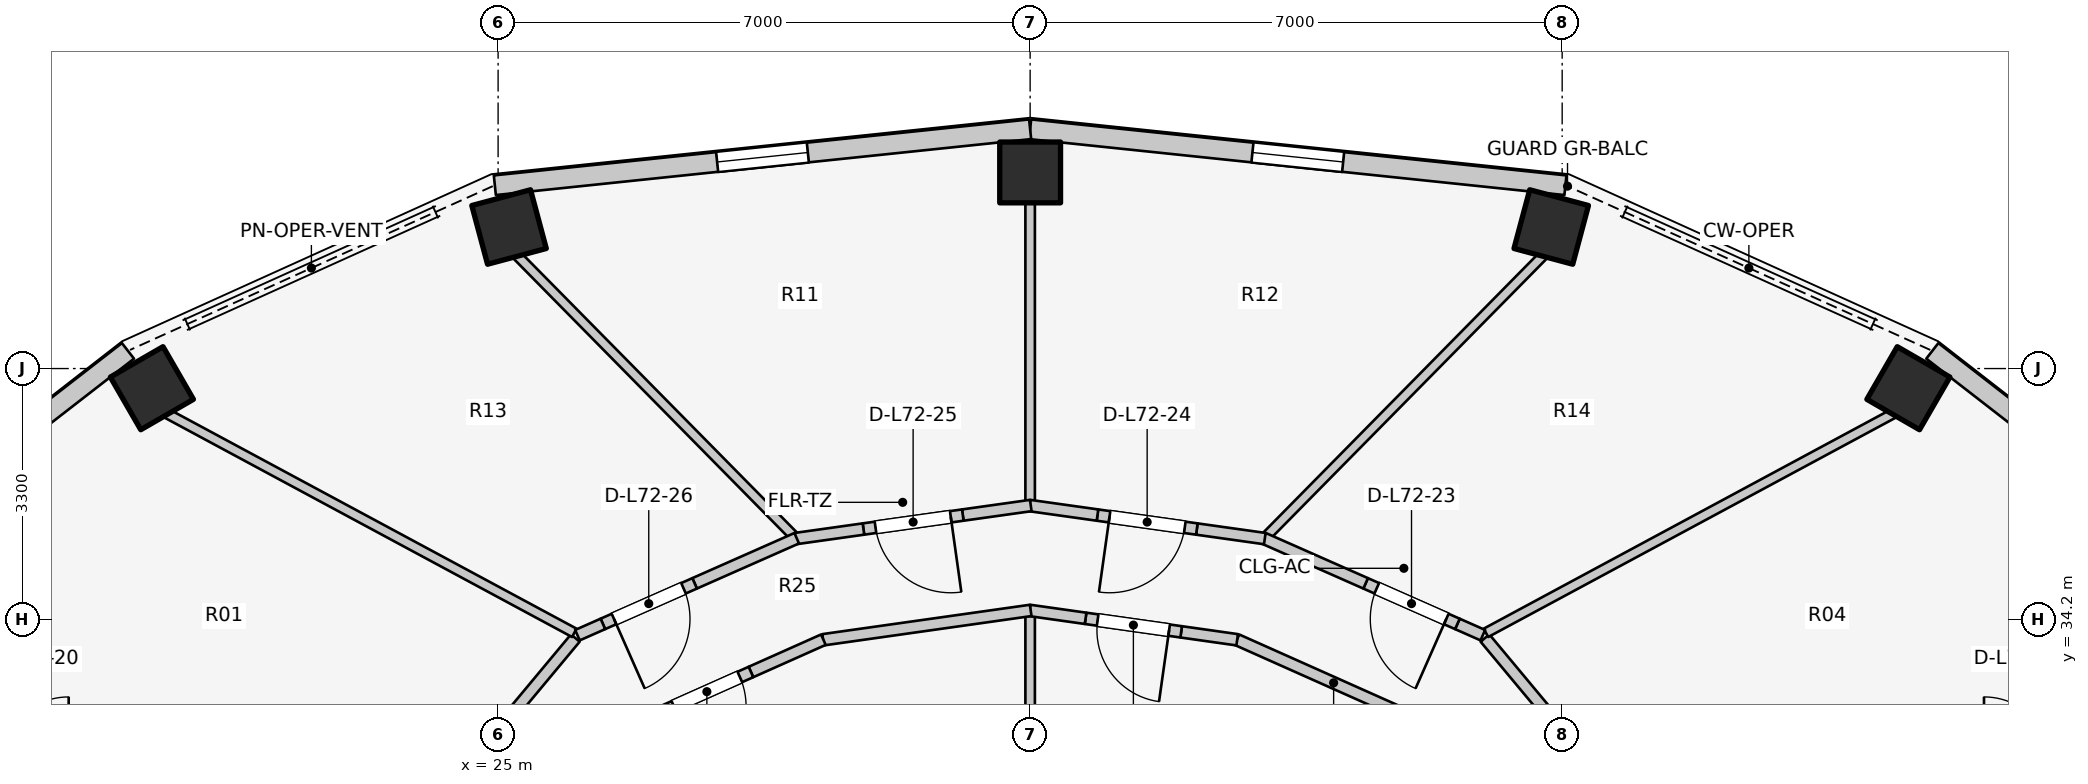
"""IFC4 building model, lengths in metres.
Left out: names, types, materials, properties, quantities, classifications, styles, units other than length and angle.
Written with IfcOpenShell. Run it as: python <this file> out.ifc"""

import sys

from ifc_helpers import new_model, si_unit, direction, frame, frame_2d, origin, origin_2d, place, context, subcontext, project, spatial, rectangle, extrude, element, fill, save


model = new_model("IFC4")
c1 = context("Model", 3, precision=1e-05, world=origin(), true_north=direction((0.0, 1.0)))
c2 = subcontext(c1, "Body", "Model", "MODEL_VIEW")
j1 = project(units=[si_unit("LENGTHUNIT", "METRE"), si_unit("PLANEANGLEUNIT", "RADIAN")], contexts=[c1])
p1 = place(None, origin())
s1 = spatial("IfcSite", under=j1, at=p1, CompositionType="ELEMENT")
p2 = place(p1, origin())
s2 = spatial("IfcBuilding", under=s1, at=p2, CompositionType="ELEMENT")
p3 = place(p2, frame((0.0, 0.0, 235.7)))
s3 = spatial("IfcBuildingStorey", under=s2, at=p3, CompositionType="ELEMENT", Elevation=235.7)
for number, where, z_axis, x_axis in (
    (1, (43.555, 37.241, 0.0), (0.0, 0.0, 1.0), (0.5, 0.866, 0.0)),
    (2, (38.856, 39.362, 0.0), (0.0, 0.0, 1.0), (0.259, 0.966, 0.0)),
    (3, (32.0, 40.08, 0.0), (0.0, 0.0, 1.0), (0.0, 1.0, 0.0)),
    (4, (25.144, 39.362, 0.0), (0.0, 0.0, 1.0), (-0.259, 0.966, 0.0)),
    (5, (20.445, 37.241, 0.0), (0.0, 0.0, 1.0), (-0.5, 0.866, 0.0)),
):
    element("IfcColumn", number, at=place(p3, frame(where, z_axis=z_axis, x_axis=x_axis)), inside=s3, PredefinedType="COLUMN", context=c2, shape_type="SweptSolid", body=[
        extrude(rectangle(XDim=0.8, YDim=0.8, at=origin_2d()), origin(), (0.0, 0.0, 1.0), 3.1),
    ])
p4 = place(p3, frame((47.558, 34.872, 0.0), z_axis=(0.0, 0.0, 1.0), x_axis=(-0.790126214723, 0.612944177563, 0.0)))
e6 = element("IfcWall", 6, at=p4, inside=s3, PredefinedType="STANDARD", context=c2, shape_type="SweptSolid", body=[
    extrude(rectangle(XDim=4.667, YDim=0.26, at=frame_2d((2.333, 0.0))), origin(), (0.0, 0.0, 1.0), 1.22),
])
p5 = place(p3, frame((39.043, 39.912, 0.0), z_axis=(0.0, 0.0, 1.0), x_axis=(-0.994582822721, 0.103947144014, 0.0)))
e7 = element("IfcWall", 7, at=p5, inside=s3, PredefinedType="STANDARD", context=c2, shape_type="SweptSolid", body=[
    extrude(rectangle(XDim=7.081, YDim=0.26, at=frame_2d((3.541, 0.0))), origin(), (0.0, 0.0, 1.0), 1.22),
])
p6 = place(p5, frame((2.941, 0.0, 0.15)))
e8 = element("IfcOpeningElement", 8, at=p6, cuts=e7, PredefinedType="OPENING", context=c2, shape_type="SweptSolid", body=[
    extrude(rectangle(XDim=1.2, YDim=0.9, at=frame_2d((0.6, 0.45))), frame((0.0, 0.14, 0.0), z_axis=(0.0, -1.0, 0.0), x_axis=(1.0, 0.0, 0.0)), (0.0, 0.0, 1.0), 0.28),
])
p7 = place(p3, frame((32.0, 40.648, 0.0), z_axis=(0.0, 0.0, 1.0), x_axis=(-0.994582822721, -0.103947144014, 0.0)))
e9 = element("IfcWall", 9, at=p7, inside=s3, PredefinedType="STANDARD", context=c2, shape_type="SweptSolid", body=[
    extrude(rectangle(XDim=7.081, YDim=0.26, at=frame_2d((3.541, 0.0))), origin(), (0.0, 0.0, 1.0), 1.22),
])
p8 = place(p7, frame((2.941, 0.0, 0.15)))
e10 = element("IfcOpeningElement", 10, at=p8, cuts=e9, PredefinedType="OPENING", context=c2, shape_type="SweptSolid", body=[
    extrude(rectangle(XDim=1.2, YDim=0.9, at=frame_2d((0.6, 0.45))), frame((0.0, 0.14, 0.0), z_axis=(0.0, -1.0, 0.0), x_axis=(1.0, 0.0, 0.0)), (0.0, 0.0, 1.0), 0.28),
])
p9 = place(p3, frame((20.13, 37.733, 0.0), z_axis=(0.0, 0.0, 1.0), x_axis=(-0.790126214723, -0.612944177563, 0.0)))
e11 = element("IfcWall", 11, at=p9, inside=s3, PredefinedType="STANDARD", context=c2, shape_type="SweptSolid", body=[
    extrude(rectangle(XDim=4.667, YDim=0.26, at=frame_2d((2.333, 0.0))), origin(), (0.0, 0.0, 1.0), 1.22),
])
p10 = place(p3, frame((32.0, 31.1, 0.0), z_axis=(0.0, 0.0, 1.0), x_axis=(0.0, 1.0, 0.0)))
e12 = element("IfcWall", 12, at=p10, inside=s3, PredefinedType="PARTITIONING", context=c2, shape_type="SweptSolid", body=[
    extrude(rectangle(XDim=3.218, YDim=0.125, at=frame_2d((1.609, 0.0))), origin(), (0.0, 0.0, 1.0), 1.22),
])
p11 = place(p3, frame((37.265, 32.798, 0.0), z_axis=(0.0, 0.0, 1.0), x_axis=(-0.913254317828, 0.407389924971, 0.0)))
e13 = element("IfcWall", 13, at=p11, inside=s3, PredefinedType="PARTITIONING", context=c2, shape_type="SweptSolid", body=[
    extrude(rectangle(XDim=2.787, YDim=0.15, at=frame_2d((1.393, 0.0))), origin(), (0.0, 0.0, 1.0), 1.22),
])
p12 = place(p3, frame((34.724, 33.932, 0.0), z_axis=(0.0, 0.0, 1.0), x_axis=(-0.990190745647, 0.13972217875, 0.0)))
e14 = element("IfcWall", 14, at=p12, inside=s3, PredefinedType="PARTITIONING", context=c2, shape_type="SweptSolid", body=[
    extrude(rectangle(XDim=0.744, YDim=0.15, at=frame_2d((0.372, 0.0))), origin(), (0.0, 0.0, 1.0), 2.575),
])
p13 = place(p3, frame((33.987, 34.036, 0.0), z_axis=(0.0, 0.0, 1.0), x_axis=(-0.990133183593, 0.140129507055, 0.0)))
e15 = element("IfcWall", 15, at=p13, inside=s3, PredefinedType="PARTITIONING", context=c2, shape_type="SweptSolid", body=[
    extrude(rectangle(XDim=1.27, YDim=0.15, at=frame_2d((0.635, 0.0))), origin(), (0.0, 0.0, 1.0), 2.575),
])
p14 = place(p13, frame((0.16, 0.0, 0.0)))
e16 = element("IfcOpeningElement", 16, at=p14, cuts=e15, PredefinedType="OPENING", context=c2, shape_type="SweptSolid", body=[
    extrude(rectangle(XDim=0.95, YDim=2.1, at=frame_2d((0.475, 1.05))), frame((0.0, 0.085, 0.0), z_axis=(0.0, -1.0, 0.0), x_axis=(1.0, 0.0, 0.0)), (0.0, 0.0, 1.0), 0.17),
])
p15 = place(p3, frame((32.729, 34.214, 0.0), z_axis=(0.0, 0.0, 1.0), x_axis=(-0.990138882688, 0.140089232242, 0.0)))
e17 = element("IfcWall", 17, at=p15, inside=s3, PredefinedType="PARTITIONING", context=c2, shape_type="SweptSolid", body=[
    extrude(rectangle(XDim=0.744, YDim=0.15, at=frame_2d((0.372, 0.0))), origin(), (0.0, 0.0, 1.0), 1.22),
])
p16 = place(p3, frame((32.007, 34.318, 0.0), z_axis=(0.0, 0.0, 1.0), x_axis=(-0.990150268487, -0.140008734782, 0.0)))
e18 = element("IfcWall", 18, at=p16, inside=s3, PredefinedType="PARTITIONING", context=c2, shape_type="SweptSolid", body=[
    extrude(rectangle(XDim=2.759, YDim=0.15, at=frame_2d((1.379, 0.0))), origin(), (0.0, 0.0, 1.0), 1.22),
])
p17 = place(p3, frame((29.28, 33.933, 0.0), z_axis=(0.0, 0.0, 1.0), x_axis=(-0.913260714955, -0.407375584099, 0.0)))
e19 = element("IfcWall", 19, at=p17, inside=s3, PredefinedType="PARTITIONING", context=c2, shape_type="SweptSolid", body=[
    extrude(rectangle(XDim=1.043, YDim=0.15, at=frame_2d((0.522, 0.0))), origin(), (0.0, 0.0, 1.0), 1.22),
])
p18 = place(p3, frame((28.327, 33.508, 0.0), z_axis=(0.0, 0.0, 1.0), x_axis=(-0.913279660534, -0.40733310896, 0.0)))
e20 = element("IfcWall", 20, at=p18, inside=s3, PredefinedType="PARTITIONING", context=c2, shape_type="SweptSolid", body=[
    extrude(rectangle(XDim=1.27, YDim=0.15, at=frame_2d((0.635, 0.0))), origin(), (0.0, 0.0, 1.0), 2.16),
])
p19 = place(p18, frame((0.16, 0.0, 0.0)))
e21 = element("IfcOpeningElement", 21, at=p19, cuts=e20, PredefinedType="OPENING", context=c2, shape_type="SweptSolid", body=[
    extrude(rectangle(XDim=0.95, YDim=2.1, at=frame_2d((0.475, 1.05))), frame((0.0, 0.085, 0.0), z_axis=(0.0, -1.0, 0.0), x_axis=(1.0, 0.0, 0.0)), (0.0, 0.0, 1.0), 0.17),
])
for number, where, z_axis, x_axis in (
    (22, (37.984, 33.955, 0.0), (0.0, 0.0, 1.0), (0.64, -0.768, 0.0)),
    (23, (26.016, 33.955, 0.0), (0.0, 0.0, 1.0), (-0.64, -0.768, 0.0)),
):
    element("IfcWall", number, at=place(p3, frame(where, z_axis=z_axis, x_axis=x_axis)), inside=s3, PredefinedType="PARTITIONING", context=c2, shape_type="SweptSolid", body=[
        extrude(rectangle(XDim=2.21, YDim=0.15, at=frame_2d((1.105, 0.0))), origin(), (0.0, 0.0, 1.0), 1.22),
    ])
p20 = place(p3, frame((37.997, 34.023, 0.0), z_axis=(0.0, 0.0, 1.0), x_axis=(0.880531534665, 0.473987569943, 0.0)))
e24 = element("IfcWall", 24, at=p20, inside=s3, PredefinedType="PARTITIONING", context=c2, shape_type="SweptSolid", body=[
    extrude(rectangle(XDim=6.096, YDim=0.125, at=frame_2d((3.048, 0.0))), origin(), (0.0, 0.0, 1.0), 1.22),
])
p21 = place(p3, frame((35.118, 35.304, 0.0), z_axis=(0.0, 0.0, 1.0), x_axis=(0.702191571271, 0.711988059756, 0.0)))
e25 = element("IfcWall", 25, at=p21, inside=s3, PredefinedType="PARTITIONING", context=c2, shape_type="SweptSolid", body=[
    extrude(rectangle(XDim=5.184, YDim=0.125, at=frame_2d((2.592, 0.0))), origin(), (0.0, 0.0, 1.0), 1.22),
])
p22 = place(p3, frame((32.0, 35.753, 0.0), z_axis=(0.0, 0.0, 1.0), x_axis=(0.0, 1.0, 0.0)))
e26 = element("IfcWall", 26, at=p22, inside=s3, PredefinedType="PARTITIONING", context=c2, shape_type="SweptSolid", body=[
    extrude(rectangle(XDim=3.947, YDim=0.125, at=frame_2d((1.974, 0.0))), origin(), (0.0, 0.0, 1.0), 1.22),
])
p23 = place(p3, frame((28.882, 35.304, 0.0), z_axis=(0.0, 0.0, 1.0), x_axis=(-0.702191571271, 0.711988059756, 0.0)))
e27 = element("IfcWall", 27, at=p23, inside=s3, PredefinedType="PARTITIONING", context=c2, shape_type="SweptSolid", body=[
    extrude(rectangle(XDim=5.184, YDim=0.125, at=frame_2d((2.592, 0.0))), origin(), (0.0, 0.0, 1.0), 1.22),
])
p24 = place(p3, frame((26.003, 34.023, 0.0), z_axis=(0.0, 0.0, 1.0), x_axis=(-0.880531534665, 0.473987569943, 0.0)))
e28 = element("IfcWall", 28, at=p24, inside=s3, PredefinedType="PARTITIONING", context=c2, shape_type="SweptSolid", body=[
    extrude(rectangle(XDim=6.096, YDim=0.125, at=frame_2d((3.048, 0.0))), origin(), (0.0, 0.0, 1.0), 1.22),
])
p25 = place(p3, frame((37.956, 33.992, 0.0), z_axis=(0.0, 0.0, 1.0), x_axis=(-0.91474391497, 0.404034119877, 0.0)))
e29 = element("IfcWall", 29, at=p25, inside=s3, PredefinedType="PARTITIONING", context=c2, shape_type="SweptSolid", body=[
    extrude(rectangle(XDim=0.366, YDim=0.15, at=frame_2d((0.183, 0.0))), origin(), (0.0, 0.0, 1.0), 2.575),
])
p26 = place(p3, frame((37.621, 34.14, 0.0), z_axis=(0.0, 0.0, 1.0), x_axis=(-0.914618215061, 0.404318588094, 0.0)))
e30 = element("IfcWall", 30, at=p26, inside=s3, PredefinedType="PARTITIONING", context=c2, shape_type="SweptSolid", body=[
    extrude(rectangle(XDim=1.32, YDim=0.15, at=frame_2d((0.66, 0.0))), origin(), (0.0, 0.0, 1.0), 2.16),
])
p27 = place(p26, frame((0.16, 0.0, 0.0)))
e31 = element("IfcOpeningElement", 31, at=p27, cuts=e30, PredefinedType="OPENING", context=c2, shape_type="SweptSolid", body=[
    extrude(rectangle(XDim=1.0, YDim=2.1, at=frame_2d((0.5, 1.05))), frame((0.0, 0.085, 0.0), z_axis=(0.0, -1.0, 0.0), x_axis=(1.0, 0.0, 0.0)), (0.0, 0.0, 1.0), 0.17),
])
p28 = place(p3, frame((36.414, 34.674, 0.0), z_axis=(0.0, 0.0, 1.0), x_axis=(-0.914639417368, 0.404270622476, 0.0)))
e32 = element("IfcWall", 32, at=p28, inside=s3, PredefinedType="PARTITIONING", context=c2, shape_type="SweptSolid", body=[
    extrude(rectangle(XDim=1.468, YDim=0.15, at=frame_2d((0.734, 0.0))), origin(), (0.0, 0.0, 1.0), 1.22),
])
p29 = place(p3, frame((35.087, 35.263, 0.0), z_axis=(0.0, 0.0, 1.0), x_axis=(-0.990260655864, 0.139225836137, 0.0)))
e33 = element("IfcWall", 33, at=p29, inside=s3, PredefinedType="PARTITIONING", context=c2, shape_type="SweptSolid", body=[
    extrude(rectangle(XDim=0.903, YDim=0.15, at=frame_2d((0.452, 0.0))), origin(), (0.0, 0.0, 1.0), 2.105),
])
p30 = place(p3, frame((34.193, 35.389, 0.0), z_axis=(0.0, 0.0, 1.0), x_axis=(-0.990279679751, 0.139090459315, 0.0)))
e34 = element("IfcWall", 34, at=p30, inside=s3, PredefinedType="PARTITIONING", context=c2, shape_type="SweptSolid", body=[
    extrude(rectangle(XDim=1.32, YDim=0.15, at=frame_2d((0.66, 0.0))), origin(), (0.0, 0.0, 1.0), 2.16),
])
p31 = place(p30, frame((0.16, 0.0, 0.0)))
e35 = element("IfcOpeningElement", 35, at=p31, cuts=e34, PredefinedType="OPENING", context=c2, shape_type="SweptSolid", body=[
    extrude(rectangle(XDim=1.0, YDim=2.1, at=frame_2d((0.5, 1.05))), frame((0.0, 0.085, 0.0), z_axis=(0.0, -1.0, 0.0), x_axis=(1.0, 0.0, 0.0)), (0.0, 0.0, 1.0), 0.17),
])
for number, where, z_axis, x_axis in (
    (36, (32.886, 35.572, 0.0), (0.0, 0.0, 1.0), (-0.99, 0.139, 0.0)),
    (37, (32.008, 35.698, 0.0), (0.0, 0.0, 1.0), (-0.99, -0.139, 0.0)),
):
    element("IfcWall", number, at=place(p3, frame(where, z_axis=z_axis, x_axis=x_axis)), inside=s3, PredefinedType="PARTITIONING", context=c2, shape_type="SweptSolid", body=[
        extrude(rectangle(XDim=0.903, YDim=0.15, at=frame_2d((0.452, 0.0))), origin(), (0.0, 0.0, 1.0), 1.22),
    ])
p32 = place(p3, frame((31.114, 35.572, 0.0), z_axis=(0.0, 0.0, 1.0), x_axis=(-0.990279679751, -0.139090459315, 0.0)))
e38 = element("IfcWall", 38, at=p32, inside=s3, PredefinedType="PARTITIONING", context=c2, shape_type="SweptSolid", body=[
    extrude(rectangle(XDim=1.32, YDim=0.15, at=frame_2d((0.66, 0.0))), origin(), (0.0, 0.0, 1.0), 2.16),
])
p33 = place(p32, frame((0.16, 0.0, 0.0)))
e39 = element("IfcOpeningElement", 39, at=p33, cuts=e38, PredefinedType="OPENING", context=c2, shape_type="SweptSolid", body=[
    extrude(rectangle(XDim=1.0, YDim=2.1, at=frame_2d((0.5, 1.05))), frame((0.0, 0.085, 0.0), z_axis=(0.0, -1.0, 0.0), x_axis=(1.0, 0.0, 0.0)), (0.0, 0.0, 1.0), 0.17),
])
p34 = place(p3, frame((29.807, 35.389, 0.0), z_axis=(0.0, 0.0, 1.0), x_axis=(-0.990260655864, -0.139225836137, 0.0)))
e40 = element("IfcWall", 40, at=p34, inside=s3, PredefinedType="PARTITIONING", context=c2, shape_type="SweptSolid", body=[
    extrude(rectangle(XDim=0.903, YDim=0.15, at=frame_2d((0.452, 0.0))), origin(), (0.0, 0.0, 1.0), 2.105),
])
p35 = place(p3, frame((28.929, 35.268, 0.0), z_axis=(0.0, 0.0, 1.0), x_axis=(-0.91466659005, -0.404209140231, 0.0)))
e41 = element("IfcWall", 41, at=p35, inside=s3, PredefinedType="PARTITIONING", context=c2, shape_type="SweptSolid", body=[
    extrude(rectangle(XDim=1.468, YDim=0.15, at=frame_2d((0.734, 0.0))), origin(), (0.0, 0.0, 1.0), 1.22),
])
p36 = place(p3, frame((27.586, 34.674, 0.0), z_axis=(0.0, 0.0, 1.0), x_axis=(-0.914618215061, -0.404318588094, 0.0)))
e42 = element("IfcWall", 42, at=p36, inside=s3, PredefinedType="PARTITIONING", context=c2, shape_type="SweptSolid", body=[
    extrude(rectangle(XDim=1.32, YDim=0.15, at=frame_2d((0.66, 0.0))), origin(), (0.0, 0.0, 1.0), 2.16),
])
p37 = place(p36, frame((0.16, 0.0, 0.0)))
e43 = element("IfcOpeningElement", 43, at=p37, cuts=e42, PredefinedType="OPENING", context=c2, shape_type="SweptSolid", body=[
    extrude(rectangle(XDim=1.0, YDim=2.1, at=frame_2d((0.5, 1.05))), frame((0.0, 0.085, 0.0), z_axis=(0.0, -1.0, 0.0), x_axis=(1.0, 0.0, 0.0)), (0.0, 0.0, 1.0), 0.17),
])
p38 = place(p3, frame((26.378, 34.14, 0.0), z_axis=(0.0, 0.0, 1.0), x_axis=(-0.914634977088, -0.404280668209, 0.0)))
e44 = element("IfcWall", 44, at=p38, inside=s3, PredefinedType="PARTITIONING", context=c2, shape_type="SweptSolid", body=[
    extrude(rectangle(XDim=0.366, YDim=0.15, at=frame_2d((0.183, 0.0))), origin(), (0.0, 0.0, 1.0), 2.575),
])
p39 = place(p6, origin())
e45 = element("IfcWindow", 45, at=p39, inside=s3, PartitioningType="SINGLE_PANEL", PredefinedType="WINDOW", context=c2, shape_type="SweptSolid", body=[
    extrude(rectangle(XDim=1.2, YDim=0.9, at=frame_2d((0.6, 0.45))), frame((0.0, 0.03, 0.0), z_axis=(0.0, -1.0, 0.0), x_axis=(1.0, 0.0, 0.0)), (0.0, 0.0, 1.0), 0.06),
])
fill(e8, e45)
p40 = place(p8, origin())
e46 = element("IfcWindow", 46, at=p40, inside=s3, PartitioningType="SINGLE_PANEL", PredefinedType="WINDOW", context=c2, shape_type="SweptSolid", body=[
    extrude(rectangle(XDim=1.2, YDim=0.9, at=frame_2d((0.6, 0.45))), frame((0.0, 0.03, 0.0), z_axis=(0.0, -1.0, 0.0), x_axis=(1.0, 0.0, 0.0)), (0.0, 0.0, 1.0), 0.06),
])
fill(e10, e46)
p41 = place(p14, origin())
e47 = element("IfcDoor", 47, at=p41, inside=s3, OperationType="SINGLE_SWING_LEFT", PredefinedType="DOOR", context=c2, shape_type="SweptSolid", body=[
    extrude(rectangle(XDim=0.95, YDim=2.1, at=frame_2d((0.475, 1.05))), frame((0.0, 0.025, 0.0), z_axis=(0.0, -1.0, 0.0), x_axis=(1.0, 0.0, 0.0)), (0.0, 0.0, 1.0), 0.05),
])
fill(e16, e47)
p42 = place(p19, origin())
e48 = element("IfcDoor", 48, at=p42, inside=s3, OperationType="SINGLE_SWING_RIGHT", PredefinedType="DOOR", context=c2, shape_type="SweptSolid", body=[
    extrude(rectangle(XDim=0.95, YDim=2.1, at=frame_2d((0.475, 1.05))), frame((0.0, 0.025, 0.0), z_axis=(0.0, -1.0, 0.0), x_axis=(1.0, 0.0, 0.0)), (0.0, 0.0, 1.0), 0.05),
])
fill(e21, e48)
p43 = place(p27, origin())
e49 = element("IfcDoor", 49, at=p43, inside=s3, OperationType="SINGLE_SWING_LEFT", PredefinedType="DOOR", context=c2, shape_type="SweptSolid", body=[
    extrude(rectangle(XDim=1.0, YDim=2.1, at=frame_2d((0.5, 1.05))), frame((0.0, 0.025, 0.0), z_axis=(0.0, -1.0, 0.0), x_axis=(1.0, 0.0, 0.0)), (0.0, 0.0, 1.0), 0.05),
])
fill(e31, e49)
p44 = place(p31, origin())
e50 = element("IfcDoor", 50, at=p44, inside=s3, OperationType="SINGLE_SWING_RIGHT", PredefinedType="DOOR", context=c2, shape_type="SweptSolid", body=[
    extrude(rectangle(XDim=1.0, YDim=2.1, at=frame_2d((0.5, 1.05))), frame((0.0, 0.025, 0.0), z_axis=(0.0, -1.0, 0.0), x_axis=(1.0, 0.0, 0.0)), (0.0, 0.0, 1.0), 0.05),
])
fill(e35, e50)
p45 = place(p33, origin())
e51 = element("IfcDoor", 51, at=p45, inside=s3, OperationType="SINGLE_SWING_LEFT", PredefinedType="DOOR", context=c2, shape_type="SweptSolid", body=[
    extrude(rectangle(XDim=1.0, YDim=2.1, at=frame_2d((0.5, 1.05))), frame((0.0, 0.025, 0.0), z_axis=(0.0, -1.0, 0.0), x_axis=(1.0, 0.0, 0.0)), (0.0, 0.0, 1.0), 0.05),
])
fill(e39, e51)
p46 = place(p37, origin())
e52 = element("IfcDoor", 52, at=p46, inside=s3, OperationType="SINGLE_SWING_RIGHT", PredefinedType="DOOR", context=c2, shape_type="SweptSolid", body=[
    extrude(rectangle(XDim=1.0, YDim=2.1, at=frame_2d((0.5, 1.05))), frame((0.0, 0.025, 0.0), z_axis=(0.0, -1.0, 0.0), x_axis=(1.0, 0.0, 0.0)), (0.0, 0.0, 1.0), 0.05),
])
fill(e43, e52)
save(model, sys.argv[1])
